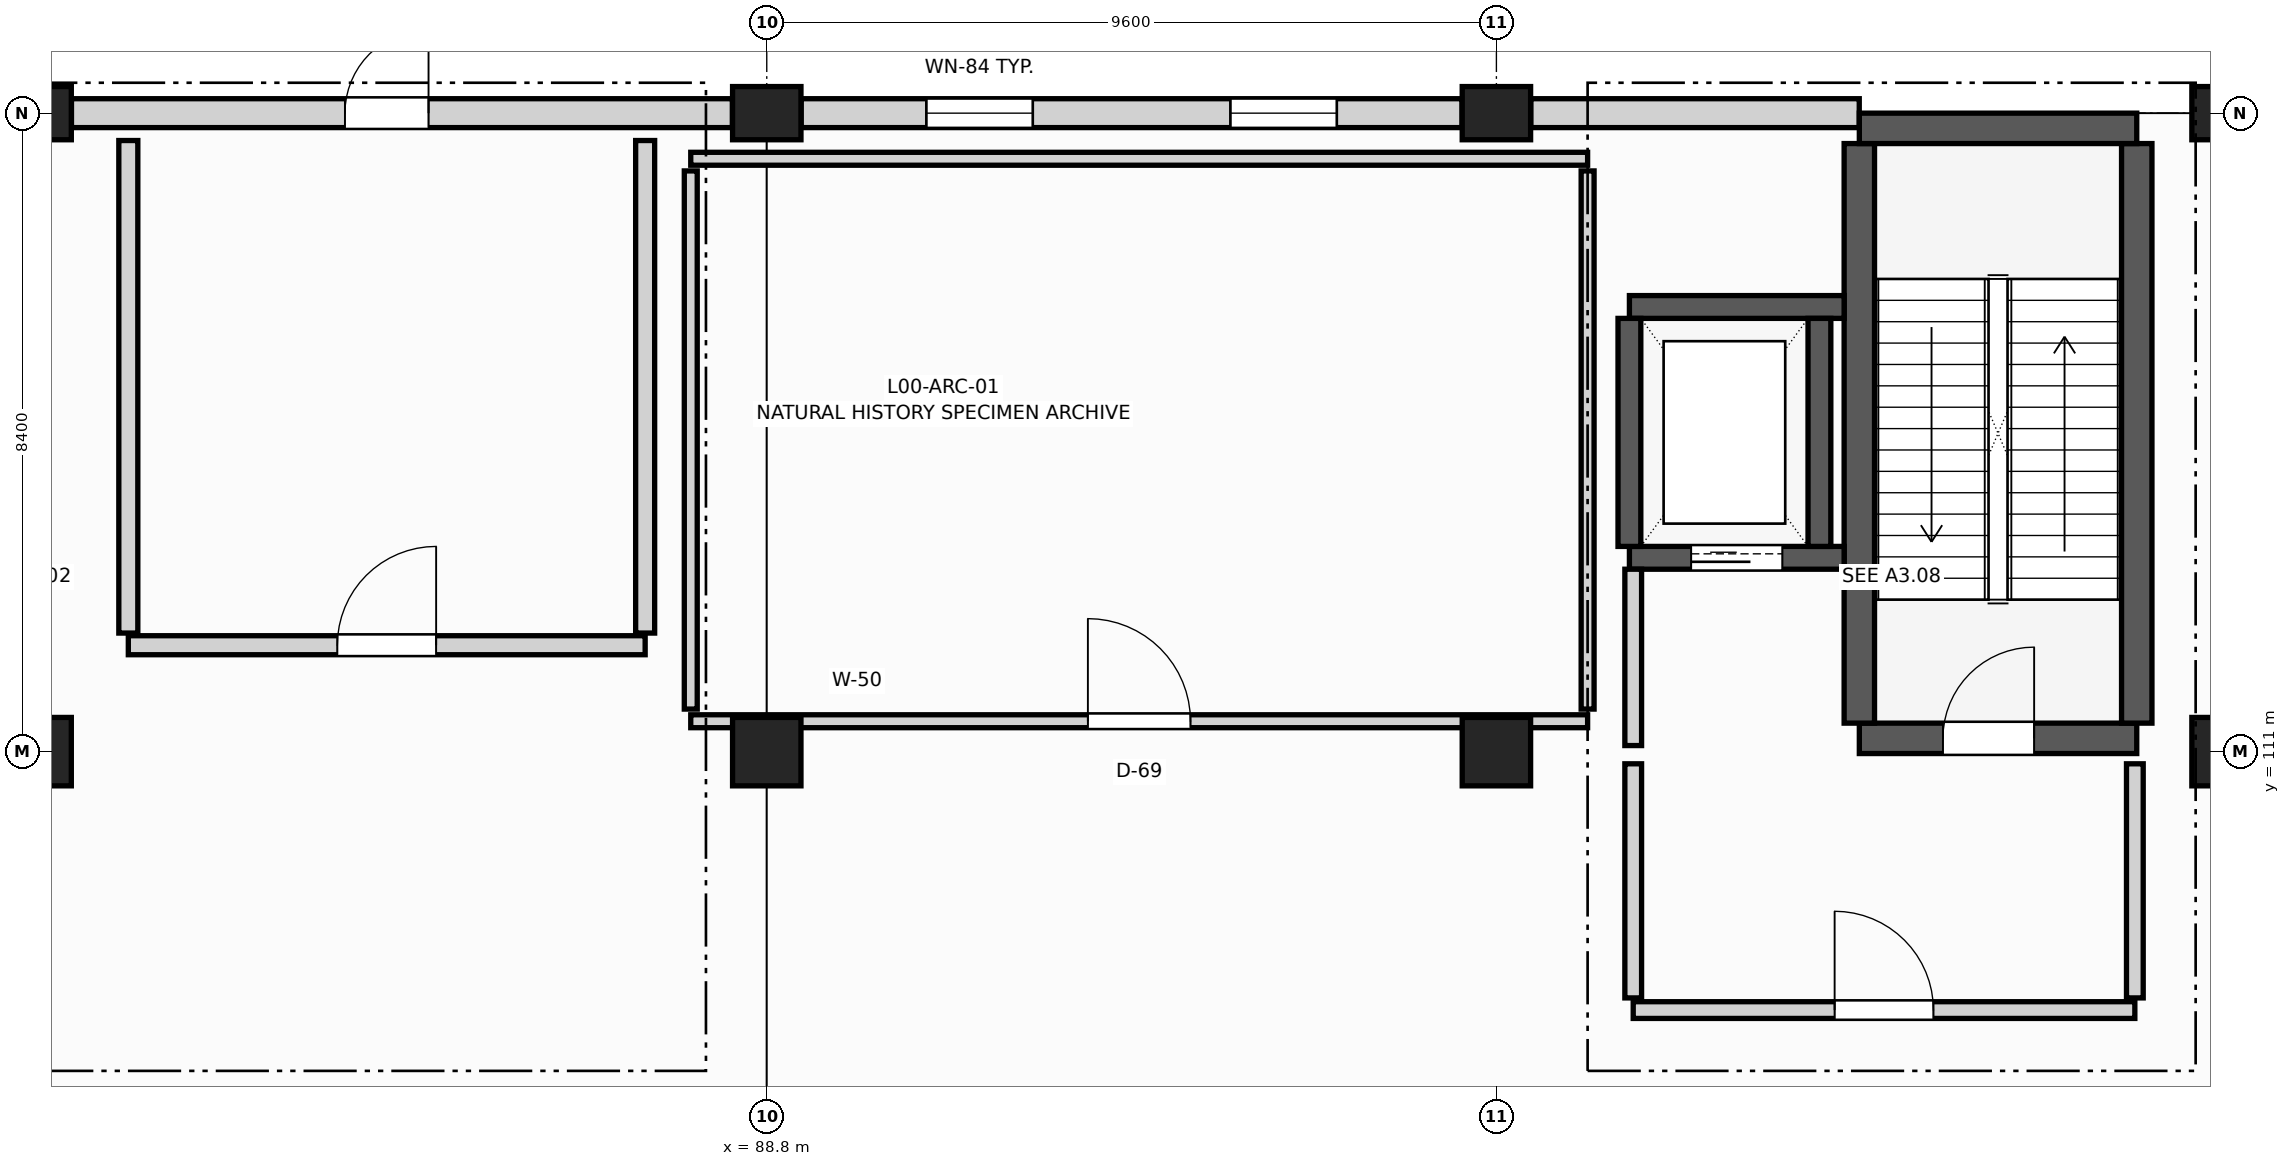
"""IFC4 building model, lengths in metres.
Left out: names, types, materials, properties, quantities, classifications, styles, units other than length and angle.
Written with IfcOpenShell. Run it as: python <this file> out.ifc"""

import sys

from ifc_helpers import new_model, si_unit, direction, frame, frame_2d, origin, origin_2d, place, context, subcontext, project, spatial, rectangle, extrude, element, fill, save


model = new_model("IFC4")
c1 = context("Model", 3, precision=1e-05, world=origin(), true_north=direction((0.0, 1.0)))
c2 = subcontext(c1, "Body", "Model", "MODEL_VIEW")
j1 = project(units=[si_unit("LENGTHUNIT", "METRE"), si_unit("PLANEANGLEUNIT", "RADIAN")], contexts=[c1])
p1 = place(None, origin())
s1 = spatial("IfcSite", under=j1, at=p1, CompositionType="ELEMENT")
p2 = place(p1, origin())
s2 = spatial("IfcBuilding", under=s1, at=p2, CompositionType="ELEMENT")
p3 = place(p2, origin())
s3 = spatial("IfcBuildingStorey", under=s2, at=p3, CompositionType="ELEMENT", Elevation=0.0)
p4 = place(p3, frame((79.2, 111.0, 0.0), z_axis=(0.0, 0.0, 1.0), x_axis=(1.0, 0.0, 0.0)))
e1 = element("IfcColumn", 1, at=p4, inside=s3, PredefinedType="COLUMN", context=c2, shape_type="SweptSolid", body=[
    extrude(rectangle(XDim=0.9, YDim=0.9, at=origin_2d()), origin(), (0.0, 0.0, 1.0), 5.08),
])
p5 = place(p3, frame((79.2, 119.4, 0.0), z_axis=(0.0, 0.0, 1.0), x_axis=(1.0, 0.0, 0.0)))
e2 = element("IfcColumn", 2, at=p5, inside=s3, PredefinedType="COLUMN", context=c2, shape_type="SweptSolid", body=[
    extrude(rectangle(XDim=0.9, YDim=0.7, at=origin_2d()), origin(), (0.0, 0.0, 1.0), 5.08),
])
p6 = place(p3, frame((88.8, 111.0, 0.0), z_axis=(0.0, 0.0, 1.0), x_axis=(1.0, 0.0, 0.0)))
e3 = element("IfcColumn", 3, at=p6, inside=s3, PredefinedType="COLUMN", context=c2, shape_type="SweptSolid", body=[
    extrude(rectangle(XDim=0.9, YDim=0.9, at=origin_2d()), origin(), (0.0, 0.0, 1.0), 5.08),
])
p7 = place(p3, frame((88.8, 119.4, 0.0), z_axis=(0.0, 0.0, 1.0), x_axis=(1.0, 0.0, 0.0)))
e4 = element("IfcColumn", 4, at=p7, inside=s3, PredefinedType="COLUMN", context=c2, shape_type="SweptSolid", body=[
    extrude(rectangle(XDim=0.9, YDim=0.7, at=origin_2d()), origin(), (0.0, 0.0, 1.0), 5.08),
])
p8 = place(p3, frame((98.4, 111.0, 0.0), z_axis=(0.0, 0.0, 1.0), x_axis=(1.0, 0.0, 0.0)))
e5 = element("IfcColumn", 5, at=p8, inside=s3, PredefinedType="COLUMN", context=c2, shape_type="SweptSolid", body=[
    extrude(rectangle(XDim=0.9, YDim=0.9, at=origin_2d()), origin(), (0.0, 0.0, 1.0), 5.08),
])
p9 = place(p3, frame((98.4, 119.4, 0.0), z_axis=(0.0, 0.0, 1.0), x_axis=(1.0, 0.0, 0.0)))
e6 = element("IfcColumn", 6, at=p9, inside=s3, PredefinedType="COLUMN", context=c2, shape_type="SweptSolid", body=[
    extrude(rectangle(XDim=0.9, YDim=0.7, at=origin_2d()), origin(), (0.0, 0.0, 1.0), 5.08),
])
p10 = place(p3, frame((108.0, 111.0, 0.0), z_axis=(0.0, 0.0, 1.0), x_axis=(1.0, 0.0, 0.0)))
e7 = element("IfcColumn", 7, at=p10, inside=s3, PredefinedType="COLUMN", context=c2, shape_type="SweptSolid", body=[
    extrude(rectangle(XDim=0.9, YDim=0.9, at=origin_2d()), origin(), (0.0, 0.0, 1.0), 5.08),
])
p11 = place(p3, frame((108.0, 119.4, 0.0), z_axis=(0.0, 0.0, 1.0), x_axis=(1.0, 0.0, 0.0)))
e8 = element("IfcColumn", 8, at=p11, inside=s3, PredefinedType="COLUMN", context=c2, shape_type="SweptSolid", body=[
    extrude(rectangle(XDim=0.9, YDim=0.7, at=origin_2d()), origin(), (0.0, 0.0, 1.0), 5.08),
])
p12 = place(p3, frame((79.652, 119.4, 0.0), z_axis=(0.0, 0.0, 1.0), x_axis=(1.0, 0.0, 0.0)))
e9 = element("IfcWall", 9, at=p12, inside=s3, PredefinedType="SOLIDWALL", context=c2, shape_type="SweptSolid", body=[
    extrude(rectangle(XDim=8.696, YDim=0.38, at=frame_2d((4.348, 0.0))), origin(), (0.0, 0.0, 1.0), 4.28),
])
p13 = place(p12, frame((3.598, 0.0, 0.0)))
e10 = element("IfcOpeningElement", 10, at=p13, cuts=e9, PredefinedType="OPENING", context=c2, shape_type="SweptSolid", body=[
    extrude(rectangle(XDim=1.1, YDim=2.2, at=frame_2d((0.55, 1.1))), frame((0.0, 0.2, 0.0), z_axis=(0.0, -1.0, 0.0), x_axis=(1.0, 0.0, 0.0)), (0.0, 0.0, 1.0), 0.4),
])
p14 = place(p3, frame((89.252, 119.4, 0.0), z_axis=(0.0, 0.0, 1.0), x_axis=(1.0, 0.0, 0.0)))
e11 = element("IfcWall", 11, at=p14, inside=s3, PredefinedType="SOLIDWALL", context=c2, shape_type="SweptSolid", body=[
    extrude(rectangle(XDim=8.696, YDim=0.38, at=frame_2d((4.348, 0.0))), origin(), (0.0, 0.0, 1.0), 4.28),
])
p15 = place(p14, frame((1.648, 0.0, 0.85)))
e12 = element("IfcOpeningElement", 12, at=p15, cuts=e11, PredefinedType="OPENING", context=c2, shape_type="SweptSolid", body=[
    extrude(rectangle(XDim=1.4, YDim=1.65, at=frame_2d((0.7, 0.825))), frame((0.0, 0.2, 0.0), z_axis=(0.0, -1.0, 0.0), x_axis=(1.0, 0.0, 0.0)), (0.0, 0.0, 1.0), 0.4),
])
p16 = place(p14, frame((5.648, 0.0, 0.85)))
e13 = element("IfcOpeningElement", 13, at=p16, cuts=e11, PredefinedType="OPENING", context=c2, shape_type="SweptSolid", body=[
    extrude(rectangle(XDim=1.4, YDim=1.65, at=frame_2d((0.7, 0.825))), frame((0.0, 0.2, 0.0), z_axis=(0.0, -1.0, 0.0), x_axis=(1.0, 0.0, 0.0)), (0.0, 0.0, 1.0), 0.4),
])
p17 = place(p3, frame((98.852, 119.4, 0.0), z_axis=(0.0, 0.0, 1.0), x_axis=(1.0, 0.0, 0.0)))
e14 = element("IfcWall", 14, at=p17, inside=s3, PredefinedType="SOLIDWALL", context=c2, shape_type="SweptSolid", body=[
    extrude(rectangle(XDim=4.322, YDim=0.38, at=frame_2d((2.161, 0.0))), origin(), (0.0, 0.0, 1.0), 4.28),
])
p18 = place(p3, frame((103.175, 111.175, 0.0), z_axis=(0.0, 0.0, 1.0), x_axis=(1.0, 0.0, 0.0)))
e15 = element("IfcWall", 15, at=p18, inside=s3, PredefinedType="SHEAR", context=c2, shape_type="SweptSolid", body=[
    extrude(rectangle(XDim=3.65, YDim=0.4, at=frame_2d((1.825, 0.0))), origin(), (0.0, 0.0, 1.0), 5.08),
])
p19 = place(p18, frame((1.1, 0.0, 0.0)))
e16 = element("IfcOpeningElement", 16, at=p19, cuts=e15, PredefinedType="OPENING", context=c2, shape_type="SweptSolid", body=[
    extrude(rectangle(XDim=1.2, YDim=2.2, at=frame_2d((0.6, 1.1))), frame((0.0, 0.21, 0.0), z_axis=(0.0, -1.0, 0.0), x_axis=(1.0, 0.0, 0.0)), (0.0, 0.0, 1.0), 0.42),
])
for number, where, z_axis, x_axis in (
    (17, (103.175, 111.375, 0.0), (0.0, 0.0, 1.0), (0.0, 1.0, 0.0)),
    (18, (106.825, 111.375, 0.0), (0.0, 0.0, 1.0), (0.0, 1.0, 0.0)),
):
    element("IfcWall", number, at=place(p3, frame(where, z_axis=z_axis, x_axis=x_axis)), inside=s3, PredefinedType="SHEAR", context=c2, shape_type="SweptSolid", body=[
        extrude(rectangle(XDim=7.625, YDim=0.4, at=frame_2d((3.812, 0.0))), origin(), (0.0, 0.0, 1.0), 5.08),
    ])
p20 = place(p3, frame((103.175, 119.2, 0.0), z_axis=(0.0, 0.0, 1.0), x_axis=(1.0, 0.0, 0.0)))
e19 = element("IfcWall", 19, at=p20, inside=s3, PredefinedType="SHEAR", context=c2, shape_type="SweptSolid", body=[
    extrude(rectangle(XDim=3.65, YDim=0.4, at=frame_2d((1.825, 0.0))), origin(), (0.0, 0.0, 1.0), 5.08),
])
p21 = place(p3, frame((100.15, 113.55, 0.0), z_axis=(0.0, 0.0, 1.0), x_axis=(1.0, 0.0, 0.0)))
e20 = element("IfcWall", 20, at=p21, inside=s3, PredefinedType="SHEAR", context=c2, shape_type="SweptSolid", body=[
    extrude(rectangle(XDim=2.825, YDim=0.3, at=frame_2d((1.413, 0.0))), origin(), (0.0, 0.0, 1.0), 5.08),
])
p22 = place(p21, frame((0.812, 0.0, 0.0)))
e21 = element("IfcOpeningElement", 21, at=p22, cuts=e20, PredefinedType="OPENING", context=c2, shape_type="SweptSolid", body=[
    extrude(rectangle(XDim=1.2, YDim=2.2, at=frame_2d((0.6, 1.1))), frame((0.0, 0.16, 0.0), z_axis=(0.0, -1.0, 0.0), x_axis=(1.0, 0.0, 0.0)), (0.0, 0.0, 1.0), 0.32),
])
p23 = place(p3, frame((100.15, 116.85, 0.0), z_axis=(0.0, 0.0, 1.0), x_axis=(1.0, 0.0, 0.0)))
e22 = element("IfcWall", 22, at=p23, inside=s3, PredefinedType="SHEAR", context=c2, shape_type="SweptSolid", body=[
    extrude(rectangle(XDim=2.825, YDim=0.3, at=frame_2d((1.413, 0.0))), origin(), (0.0, 0.0, 1.0), 5.08),
])
for number, where, z_axis, x_axis in (
    (23, (100.15, 113.7, 0.0), (0.0, 0.0, 1.0), (0.0, 1.0, 0.0)),
    (24, (102.65, 113.7, 0.0), (0.0, 0.0, 1.0), (0.0, 1.0, 0.0)),
):
    element("IfcWall", number, at=place(p3, frame(where, z_axis=z_axis, x_axis=x_axis)), inside=s3, PredefinedType="SHEAR", context=c2, shape_type="SweptSolid", body=[
        extrude(rectangle(XDim=3.0, YDim=0.3, at=frame_2d((1.5, 0.0))), origin(), (0.0, 0.0, 1.0), 5.08),
    ])
p24 = place(p3, frame((100.2, 107.6, 0.0), z_axis=(0.0, 0.0, 1.0), x_axis=(1.0, 0.0, 0.0)))
e25 = element("IfcWall", 25, at=p24, inside=s3, PredefinedType="PARTITIONING", context=c2, shape_type="SweptSolid", body=[
    extrude(rectangle(XDim=6.6, YDim=0.22, at=frame_2d((3.3, 0.0))), origin(), (0.0, 0.0, 1.0), 4.12),
])
p25 = place(p24, frame((2.65, 0.0, 0.0)))
e26 = element("IfcOpeningElement", 26, at=p25, cuts=e25, PredefinedType="OPENING", context=c2, shape_type="SweptSolid", body=[
    extrude(rectangle(XDim=1.3, YDim=2.2, at=frame_2d((0.65, 1.1))), frame((0.0, 0.12, 0.0), z_axis=(0.0, -1.0, 0.0), x_axis=(1.0, 0.0, 0.0)), (0.0, 0.0, 1.0), 0.24),
])
p26 = place(p3, frame((100.2, 111.08, 0.0), z_axis=(0.0, 0.0, 1.0), x_axis=(0.0, 1.0, 0.0)))
e27 = element("IfcWall", 27, at=p26, inside=s3, PredefinedType="PARTITIONING", context=c2, shape_type="SweptSolid", body=[
    extrude(rectangle(XDim=2.32, YDim=0.22, at=frame_2d((1.16, 0.0))), origin(), (0.0, 0.0, 1.0), 4.12),
])
for number, where, z_axis, x_axis in (
    (28, (100.2, 107.76, 0.0), (0.0, 0.0, 1.0), (0.0, 1.0, 0.0)),
    (29, (106.8, 107.76, 0.0), (0.0, 0.0, 1.0), (0.0, 1.0, 0.0)),
):
    element("IfcWall", number, at=place(p3, frame(where, z_axis=z_axis, x_axis=x_axis)), inside=s3, PredefinedType="PARTITIONING", context=c2, shape_type="SweptSolid", body=[
        extrude(rectangle(XDim=3.08, YDim=0.22, at=frame_2d((1.54, 0.0))), origin(), (0.0, 0.0, 1.0), 4.12),
    ])
p27 = place(p3, frame((80.4, 112.4, 0.0), z_axis=(0.0, 0.0, 1.0), x_axis=(1.0, 0.0, 0.0)))
e30 = element("IfcWall", 30, at=p27, inside=s3, PredefinedType="PARTITIONING", context=c2, shape_type="SweptSolid", body=[
    extrude(rectangle(XDim=6.8, YDim=0.25, at=frame_2d((3.4, 0.0))), origin(), (0.0, 0.0, 1.0), 4.12),
])
p28 = place(p27, frame((2.75, 0.0, 0.0)))
e31 = element("IfcOpeningElement", 31, at=p28, cuts=e30, PredefinedType="OPENING", context=c2, shape_type="SweptSolid", body=[
    extrude(rectangle(XDim=1.3, YDim=2.2, at=frame_2d((0.65, 1.1))), frame((0.0, 0.135, 0.0), z_axis=(0.0, -1.0, 0.0), x_axis=(1.0, 0.0, 0.0)), (0.0, 0.0, 1.0), 0.27),
])
for number, where, z_axis, x_axis in (
    (32, (80.4, 112.56, 0.0), (0.0, 0.0, 1.0), (0.0, 1.0, 0.0)),
    (33, (87.2, 112.56, 0.0), (0.0, 0.0, 1.0), (0.0, 1.0, 0.0)),
):
    element("IfcWall", number, at=place(p3, frame(where, z_axis=z_axis, x_axis=x_axis)), inside=s3, PredefinedType="PARTITIONING", context=c2, shape_type="SweptSolid", body=[
        extrude(rectangle(XDim=6.48, YDim=0.25, at=frame_2d((3.24, 0.0))), origin(), (0.0, 0.0, 1.0), 4.12),
    ])
p29 = place(p3, frame((87.8, 111.4, 0.0), z_axis=(0.0, 0.0, 1.0), x_axis=(1.0, 0.0, 0.0)))
e34 = element("IfcWall", 34, at=p29, inside=s3, PredefinedType="PARTITIONING", context=c2, shape_type="SweptSolid", body=[
    extrude(rectangle(XDim=11.8, YDim=0.17, at=frame_2d((5.9, 0.0))), origin(), (0.0, 0.0, 1.0), 4.12),
])
p30 = place(p29, frame((5.225, 0.0, 0.0)))
e35 = element("IfcOpeningElement", 35, at=p30, cuts=e34, PredefinedType="OPENING", context=c2, shape_type="SweptSolid", body=[
    extrude(rectangle(XDim=1.35, YDim=2.25, at=frame_2d((0.675, 1.125))), frame((0.0, 0.095, 0.0), z_axis=(0.0, -1.0, 0.0), x_axis=(1.0, 0.0, 0.0)), (0.0, 0.0, 1.0), 0.19),
])
p31 = place(p3, frame((87.8, 118.8, 0.0), z_axis=(0.0, 0.0, 1.0), x_axis=(1.0, 0.0, 0.0)))
e36 = element("IfcWall", 36, at=p31, inside=s3, PredefinedType="PARTITIONING", context=c2, shape_type="SweptSolid", body=[
    extrude(rectangle(XDim=11.8, YDim=0.17, at=frame_2d((5.9, 0.0))), origin(), (0.0, 0.0, 1.0), 4.12),
])
for number, where, z_axis, x_axis in (
    (37, (87.8, 111.56, 0.0), (0.0, 0.0, 1.0), (0.0, 1.0, 0.0)),
    (38, (99.6, 111.56, 0.0), (0.0, 0.0, 1.0), (0.0, 1.0, 0.0)),
):
    element("IfcWall", number, at=place(p3, frame(where, z_axis=z_axis, x_axis=x_axis)), inside=s3, PredefinedType="PARTITIONING", context=c2, shape_type="SweptSolid", body=[
        extrude(rectangle(XDim=7.08, YDim=0.17, at=frame_2d((3.54, 0.0))), origin(), (0.0, 0.0, 1.0), 4.12),
    ])
p32 = place(p15, origin())
e39 = element("IfcWindow", 39, at=p32, inside=s3, PartitioningType="SINGLE_PANEL", PredefinedType="WINDOW", context=c2, shape_type="SweptSolid", body=[
    extrude(rectangle(XDim=1.4, YDim=1.65, at=frame_2d((0.7, 0.825))), frame((0.0, 0.03, 0.0), z_axis=(0.0, -1.0, 0.0), x_axis=(1.0, 0.0, 0.0)), (0.0, 0.0, 1.0), 0.06),
])
fill(e12, e39)
p33 = place(p16, origin())
e40 = element("IfcWindow", 40, at=p33, inside=s3, PartitioningType="SINGLE_PANEL", PredefinedType="WINDOW", context=c2, shape_type="SweptSolid", body=[
    extrude(rectangle(XDim=1.4, YDim=1.65, at=frame_2d((0.7, 0.825))), frame((0.0, 0.03, 0.0), z_axis=(0.0, -1.0, 0.0), x_axis=(1.0, 0.0, 0.0)), (0.0, 0.0, 1.0), 0.06),
])
fill(e13, e40)
p34 = place(p13, origin())
e41 = element("IfcDoor", 41, at=p34, inside=s3, OperationType="SINGLE_SWING_RIGHT", PredefinedType="DOOR", context=c2, shape_type="SweptSolid", body=[
    extrude(rectangle(XDim=1.1, YDim=2.2, at=frame_2d((0.55, 1.1))), frame((0.0, 0.025, 0.0), z_axis=(0.0, -1.0, 0.0), x_axis=(1.0, 0.0, 0.0)), (0.0, 0.0, 1.0), 0.05),
])
fill(e10, e41)
p35 = place(p19, origin())
e42 = element("IfcDoor", 42, at=p35, inside=s3, OperationType="SINGLE_SWING_RIGHT", PredefinedType="DOOR", context=c2, shape_type="SweptSolid", body=[
    extrude(rectangle(XDim=1.2, YDim=2.2, at=frame_2d((0.6, 1.1))), frame((0.0, 0.025, 0.0), z_axis=(0.0, -1.0, 0.0), x_axis=(1.0, 0.0, 0.0)), (0.0, 0.0, 1.0), 0.05),
])
fill(e16, e42)
p36 = place(p22, origin())
e43 = element("IfcDoor", 43, at=p36, inside=s3, OperationType="SLIDING_TO_LEFT", PredefinedType="DOOR", context=c2, shape_type="SweptSolid", body=[
    extrude(rectangle(XDim=1.2, YDim=2.2, at=frame_2d((0.6, 1.1))), frame((0.0, 0.025, 0.0), z_axis=(0.0, -1.0, 0.0), x_axis=(1.0, 0.0, 0.0)), (0.0, 0.0, 1.0), 0.05),
])
fill(e21, e43)
p37 = place(p25, origin())
e44 = element("IfcDoor", 44, at=p37, inside=s3, OperationType="SINGLE_SWING_LEFT", PredefinedType="DOOR", context=c2, shape_type="SweptSolid", body=[
    extrude(rectangle(XDim=1.3, YDim=2.2, at=frame_2d((0.65, 1.1))), frame((0.0, 0.025, 0.0), z_axis=(0.0, -1.0, 0.0), x_axis=(1.0, 0.0, 0.0)), (0.0, 0.0, 1.0), 0.05),
])
fill(e26, e44)
p38 = place(p28, origin())
e45 = element("IfcDoor", 45, at=p38, inside=s3, OperationType="SINGLE_SWING_RIGHT", PredefinedType="DOOR", context=c2, shape_type="SweptSolid", body=[
    extrude(rectangle(XDim=1.3, YDim=2.2, at=frame_2d((0.65, 1.1))), frame((0.0, 0.025, 0.0), z_axis=(0.0, -1.0, 0.0), x_axis=(1.0, 0.0, 0.0)), (0.0, 0.0, 1.0), 0.05),
])
fill(e31, e45)
p39 = place(p30, origin())
e46 = element("IfcDoor", 46, at=p39, inside=s3, OperationType="SINGLE_SWING_LEFT", PredefinedType="DOOR", context=c2, shape_type="SweptSolid", body=[
    extrude(rectangle(XDim=1.35, YDim=2.25, at=frame_2d((0.675, 1.125))), frame((0.0, 0.025, 0.0), z_axis=(0.0, -1.0, 0.0), x_axis=(1.0, 0.0, 0.0)), (0.0, 0.0, 1.0), 0.05),
])
fill(e35, e46)
save(model, sys.argv[1])
